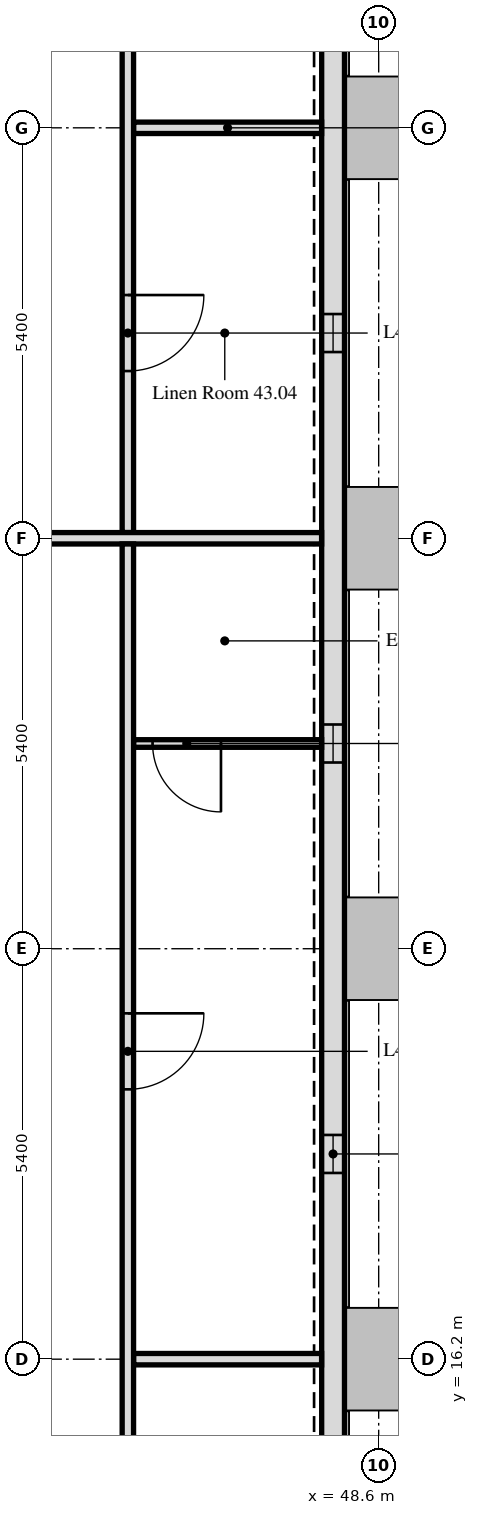
"""IFC4 building model, lengths in metres.
Left out: names, types, materials, properties, quantities, classifications, styles, units other than length and angle.
Written with IfcOpenShell. Run it as: python <this file> out.ifc"""

import sys

from ifc_helpers import new_model, si_unit, direction, frame, frame_2d, origin, place, context, subcontext, project, spatial, rectangle, extrude, element, fill, save


model = new_model("IFC4")
c1 = context("Model", 3, precision=1e-05, world=origin(), true_north=direction((0.0, 1.0)))
c2 = subcontext(c1, "Body", "Model", "MODEL_VIEW")
j1 = project(units=[si_unit("LENGTHUNIT", "METRE"), si_unit("PLANEANGLEUNIT", "RADIAN")], contexts=[c1])
p1 = place(None, origin())
s1 = spatial("IfcSite", under=j1, at=p1, CompositionType="ELEMENT")
p2 = place(p1, origin())
s2 = spatial("IfcBuilding", under=s1, at=p2, CompositionType="ELEMENT")
p3 = place(p2, frame((0.0, 0.0, 180.7)))
s3 = spatial("IfcBuildingStorey", under=s2, at=p3, CompositionType="ELEMENT", Elevation=180.7)
p4 = place(p3, frame((48.0, 10.986, 0.0), z_axis=(0.0, 0.0, 1.0), x_axis=(0.0, 1.0, 0.0)))
e1 = element("IfcWall", 1, at=p4, inside=s3, PredefinedType="SOLIDWALL", context=c2, shape_type="SweptSolid", body=[
    extrude(rectangle(XDim=32.027, YDim=0.3, at=frame_2d((16.014, 0.0))), origin(), (0.0, 0.0, 1.0), 3.0),
])
p5 = place(p4, frame((1.164, 0.0, 0.9)))
e2 = element("IfcOpeningElement", 2, at=p5, cuts=e1, PredefinedType="OPENING", context=c2, shape_type="SweptSolid", body=[
    extrude(rectangle(XDim=1.1, YDim=1.7, at=frame_2d((0.55, 0.85))), frame((0.0, 0.16, 0.0), z_axis=(0.0, -1.0, 0.0), x_axis=(1.0, 0.0, 0.0)), (0.0, 0.0, 1.0), 0.32),
])
p6 = place(p4, frame((2.764, 0.0, 0.9)))
e3 = element("IfcOpeningElement", 3, at=p6, cuts=e1, PredefinedType="OPENING", context=c2, shape_type="SweptSolid", body=[
    extrude(rectangle(XDim=1.1, YDim=1.7, at=frame_2d((0.55, 0.85))), frame((0.0, 0.16, 0.0), z_axis=(0.0, -1.0, 0.0), x_axis=(1.0, 0.0, 0.0)), (0.0, 0.0, 1.0), 0.32),
])
p7 = place(p4, frame((7.664, 0.0, 0.9)))
e4 = element("IfcOpeningElement", 4, at=p7, cuts=e1, PredefinedType="OPENING", context=c2, shape_type="SweptSolid", body=[
    extrude(rectangle(XDim=0.5, YDim=1.7, at=frame_2d((0.25, 0.85))), frame((0.0, 0.16, 0.0), z_axis=(0.0, -1.0, 0.0), x_axis=(1.0, 0.0, 0.0)), (0.0, 0.0, 1.0), 0.32),
])
p8 = place(p4, frame((13.064, 0.0, 0.9)))
e5 = element("IfcOpeningElement", 5, at=p8, cuts=e1, PredefinedType="OPENING", context=c2, shape_type="SweptSolid", body=[
    extrude(rectangle(XDim=0.5, YDim=1.7, at=frame_2d((0.25, 0.85))), frame((0.0, 0.16, 0.0), z_axis=(0.0, -1.0, 0.0), x_axis=(1.0, 0.0, 0.0)), (0.0, 0.0, 1.0), 0.32),
])
p9 = place(p4, frame((18.464, 0.0, 0.9)))
e6 = element("IfcOpeningElement", 6, at=p9, cuts=e1, PredefinedType="OPENING", context=c2, shape_type="SweptSolid", body=[
    extrude(rectangle(XDim=0.5, YDim=1.7, at=frame_2d((0.25, 0.85))), frame((0.0, 0.16, 0.0), z_axis=(0.0, -1.0, 0.0), x_axis=(1.0, 0.0, 0.0)), (0.0, 0.0, 1.0), 0.32),
])
p10 = place(p4, frame((23.864, 0.0, 0.9)))
e7 = element("IfcOpeningElement", 7, at=p10, cuts=e1, PredefinedType="OPENING", context=c2, shape_type="SweptSolid", body=[
    extrude(rectangle(XDim=0.5, YDim=1.7, at=frame_2d((0.25, 0.85))), frame((0.0, 0.16, 0.0), z_axis=(0.0, -1.0, 0.0), x_axis=(1.0, 0.0, 0.0)), (0.0, 0.0, 1.0), 0.32),
])
p11 = place(p4, frame((28.164, 0.0, 0.9)))
e8 = element("IfcOpeningElement", 8, at=p11, cuts=e1, PredefinedType="OPENING", context=c2, shape_type="SweptSolid", body=[
    extrude(rectangle(XDim=1.1, YDim=1.7, at=frame_2d((0.55, 0.85))), frame((0.0, 0.16, 0.0), z_axis=(0.0, -1.0, 0.0), x_axis=(1.0, 0.0, 0.0)), (0.0, 0.0, 1.0), 0.32),
])
p12 = place(p4, frame((29.764, 0.0, 0.9)))
e9 = element("IfcOpeningElement", 9, at=p12, cuts=e1, PredefinedType="OPENING", context=c2, shape_type="SweptSolid", body=[
    extrude(rectangle(XDim=1.1, YDim=1.7, at=frame_2d((0.55, 0.85))), frame((0.0, 0.16, 0.0), z_axis=(0.0, -1.0, 0.0), x_axis=(1.0, 0.0, 0.0)), (0.0, 0.0, 1.0), 0.32),
])
p13 = place(p3, frame((45.375, 32.4, 0.0), z_axis=(0.0, 0.0, 1.0), x_axis=(1.0, 0.0, 0.0)))
e10 = element("IfcWall", 10, at=p13, inside=s3, PredefinedType="PARTITIONING", context=c2, shape_type="SweptSolid", body=[
    extrude(rectangle(XDim=2.474, YDim=0.15, at=frame_2d((1.237, 0.0))), origin(), (0.0, 0.0, 1.0), 2.4),
])
p14 = place(p3, frame((45.3, 40.425, 0.0), z_axis=(0.0, 0.0, 1.0), x_axis=(0.0, -1.0, 0.0)))
e11 = element("IfcWall", 11, at=p14, inside=s3, PredefinedType="PARTITIONING", context=c2, shape_type="SweptSolid", body=[
    extrude(rectangle(XDim=13.35, YDim=0.15, at=frame_2d((6.675, 0.0))), origin(), (0.0, 0.0, 1.0), 2.4),
])
p15 = place(p14, frame((10.225, 0.0, 0.0)))
e12 = element("IfcOpeningElement", 12, at=p15, cuts=e11, PredefinedType="OPENING", context=c2, shape_type="SweptSolid", body=[
    extrude(rectangle(XDim=1.0, YDim=2.1, at=frame_2d((0.5, 1.05))), frame((0.0, 0.075, 0.0), z_axis=(0.0, -1.0, 0.0), x_axis=(1.0, 0.0, 0.0)), (0.0, 0.0, 1.0), 0.15),
])
p16 = place(p14, frame((4.825, 0.0, 0.0)))
e13 = element("IfcOpeningElement", 13, at=p16, cuts=e11, PredefinedType="OPENING", context=c2, shape_type="SweptSolid", body=[
    extrude(rectangle(XDim=1.0, YDim=2.1, at=frame_2d((0.5, 1.05))), frame((0.0, 0.075, 0.0), z_axis=(0.0, -1.0, 0.0), x_axis=(1.0, 0.0, 0.0)), (0.0, 0.0, 1.0), 0.15),
])
p17 = place(p3, frame((43.2, 27.0, 0.0), z_axis=(0.0, 0.0, 1.0), x_axis=(1.0, 0.0, 0.0)))
e14 = element("IfcWall", 14, at=p17, inside=s3, PredefinedType="PARTITIONING", context=c2, shape_type="SweptSolid", body=[
    extrude(rectangle(XDim=4.649, YDim=0.15, at=frame_2d((2.325, 0.0))), origin(), (0.0, 0.0, 1.0), 2.4),
])
p18 = place(p3, frame((47.849, 16.2, 0.0), z_axis=(0.0, 0.0, 1.0), x_axis=(-1.0, 0.0, 0.0)))
e15 = element("IfcWall", 15, at=p18, inside=s3, PredefinedType="PARTITIONING", context=c2, shape_type="SweptSolid", body=[
    extrude(rectangle(XDim=2.474, YDim=0.15, at=frame_2d((1.237, 0.0))), origin(), (0.0, 0.0, 1.0), 2.4),
])
p19 = place(p3, frame((47.849, 24.3, 0.0), z_axis=(0.0, 0.0, 1.0), x_axis=(-1.0, 0.0, 0.0)))
e16 = element("IfcWall", 16, at=p19, inside=s3, PredefinedType="PARTITIONING", context=c2, shape_type="SweptSolid", body=[
    extrude(rectangle(XDim=2.474, YDim=0.1, at=frame_2d((1.237, 0.0))), origin(), (0.0, 0.0, 1.0), 3.0),
])
p20 = place(p19, frame((1.324, 0.0, 0.0)))
e17 = element("IfcOpeningElement", 17, at=p20, cuts=e16, PredefinedType="OPENING", context=c2, shape_type="SweptSolid", body=[
    extrude(rectangle(XDim=0.9, YDim=2.1, at=frame_2d((0.45, 1.05))), frame((0.0, 0.05, 0.0), z_axis=(0.0, -1.0, 0.0), x_axis=(1.0, 0.0, 0.0)), (0.0, 0.0, 1.0), 0.1),
])
p21 = place(p3, frame((45.3, 26.925, 0.0), z_axis=(0.0, 0.0, 1.0), x_axis=(0.0, -1.0, 0.0)))
e18 = element("IfcWall", 18, at=p21, inside=s3, PredefinedType="PARTITIONING", context=c2, shape_type="SweptSolid", body=[
    extrude(rectangle(XDim=15.15, YDim=0.15, at=frame_2d((7.575, 0.0))), origin(), (0.0, 0.0, 1.0), 2.4),
])
p22 = place(p21, frame((12.475, 0.0, 0.0)))
e19 = element("IfcOpeningElement", 19, at=p22, cuts=e18, PredefinedType="OPENING", context=c2, shape_type="SweptSolid", body=[
    extrude(rectangle(XDim=1.0, YDim=2.1, at=frame_2d((0.5, 1.05))), frame((0.0, 0.075, 0.0), z_axis=(0.0, -1.0, 0.0), x_axis=(1.0, 0.0, 0.0)), (0.0, 0.0, 1.0), 0.15),
])
p23 = place(p21, frame((6.175, 0.0, 0.0)))
e20 = element("IfcOpeningElement", 20, at=p23, cuts=e18, PredefinedType="OPENING", context=c2, shape_type="SweptSolid", body=[
    extrude(rectangle(XDim=1.0, YDim=2.1, at=frame_2d((0.5, 1.05))), frame((0.0, 0.075, 0.0), z_axis=(0.0, -1.0, 0.0), x_axis=(1.0, 0.0, 0.0)), (0.0, 0.0, 1.0), 0.15),
])
p24 = place(p7, origin())
e21 = element("IfcWindow", 21, at=p24, inside=s3, PartitioningType="SINGLE_PANEL", PredefinedType="WINDOW", context=c2, shape_type="SweptSolid", body=[
    extrude(rectangle(XDim=0.5, YDim=1.7, at=frame_2d((0.25, 0.85))), frame((0.0, 0.03, 0.0), z_axis=(0.0, -1.0, 0.0), x_axis=(1.0, 0.0, 0.0)), (0.0, 0.0, 1.0), 0.06),
])
fill(e4, e21)
p25 = place(p8, origin())
e22 = element("IfcWindow", 22, at=p25, inside=s3, PartitioningType="SINGLE_PANEL", PredefinedType="WINDOW", context=c2, shape_type="SweptSolid", body=[
    extrude(rectangle(XDim=0.5, YDim=1.7, at=frame_2d((0.25, 0.85))), frame((0.0, 0.03, 0.0), z_axis=(0.0, -1.0, 0.0), x_axis=(1.0, 0.0, 0.0)), (0.0, 0.0, 1.0), 0.06),
])
fill(e5, e22)
p26 = place(p9, origin())
e23 = element("IfcWindow", 23, at=p26, inside=s3, PartitioningType="SINGLE_PANEL", PredefinedType="WINDOW", context=c2, shape_type="SweptSolid", body=[
    extrude(rectangle(XDim=0.5, YDim=1.7, at=frame_2d((0.25, 0.85))), frame((0.0, 0.03, 0.0), z_axis=(0.0, -1.0, 0.0), x_axis=(1.0, 0.0, 0.0)), (0.0, 0.0, 1.0), 0.06),
])
fill(e6, e23)
p27 = place(p15, origin())
e24 = element("IfcDoor", 24, at=p27, inside=s3, OperationType="SINGLE_SWING_RIGHT", PredefinedType="DOOR", context=c2, shape_type="SweptSolid", body=[
    extrude(rectangle(XDim=1.0, YDim=2.1, at=frame_2d((0.5, 1.05))), frame((0.0, 0.025, 0.0), z_axis=(0.0, -1.0, 0.0), x_axis=(1.0, 0.0, 0.0)), (0.0, 0.0, 1.0), 0.05),
])
fill(e12, e24)
p28 = place(p20, origin())
e25 = element("IfcDoor", 25, at=p28, inside=s3, OperationType="SINGLE_SWING_RIGHT", PredefinedType="DOOR", context=c2, shape_type="SweptSolid", body=[
    extrude(rectangle(XDim=0.9, YDim=2.1, at=frame_2d((0.45, 1.05))), frame((0.0, 0.025, 0.0), z_axis=(0.0, -1.0, 0.0), x_axis=(1.0, 0.0, 0.0)), (0.0, 0.0, 1.0), 0.05),
])
fill(e17, e25)
p29 = place(p23, origin())
e26 = element("IfcDoor", 26, at=p29, inside=s3, OperationType="SINGLE_SWING_LEFT", PredefinedType="DOOR", context=c2, shape_type="SweptSolid", body=[
    extrude(rectangle(XDim=1.0, YDim=2.1, at=frame_2d((0.5, 1.05))), frame((0.0, 0.025, 0.0), z_axis=(0.0, -1.0, 0.0), x_axis=(1.0, 0.0, 0.0)), (0.0, 0.0, 1.0), 0.05),
])
fill(e20, e26)
save(model, sys.argv[1])
